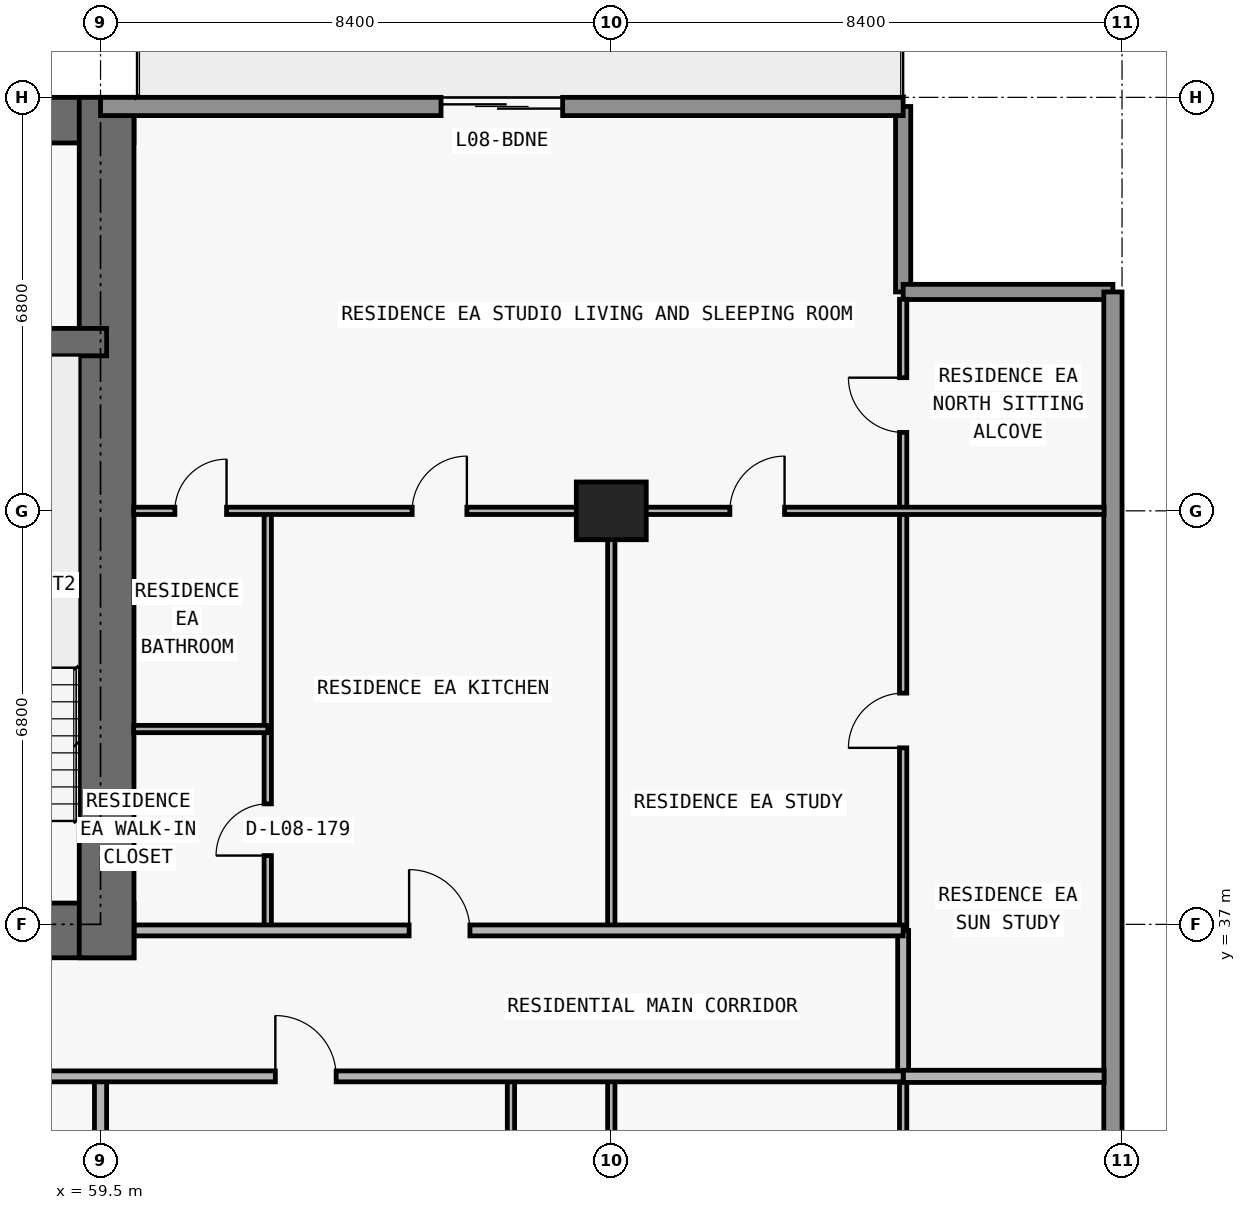
"""IFC4 building model, lengths in metres.
Left out: names, types, materials, properties, quantities, classifications, styles, units other than length and angle.
Written with IfcOpenShell. Run it as: python <this file> out.ifc"""

import sys

from ifc_helpers import new_model, si_unit, direction, frame, frame_2d, origin, origin_2d, place, context, subcontext, project, spatial, rectangle, extrude, element, fill, save


model = new_model("IFC4")
c1 = context("Model", 3, precision=1e-05, world=origin(), true_north=direction((0.0, 1.0)))
c2 = subcontext(c1, "Body", "Model", "MODEL_VIEW")
j1 = project(units=[si_unit("LENGTHUNIT", "METRE"), si_unit("PLANEANGLEUNIT", "RADIAN")], contexts=[c1])
p1 = place(None, origin())
s1 = spatial("IfcSite", under=j1, at=p1, CompositionType="ELEMENT")
p2 = place(p1, origin())
s2 = spatial("IfcBuilding", under=s1, at=p2, CompositionType="ELEMENT")
p3 = place(p2, frame((0.0, 0.0, 36.6)))
s3 = spatial("IfcBuildingStorey", under=s2, at=p3, CompositionType="ELEMENT", Elevation=36.6)
p4 = place(p3, frame((67.9, 43.8, 0.0), z_axis=(0.0, 0.0, 1.0), x_axis=(1.0, 0.0, 0.0)))
e1 = element("IfcColumn", 1, at=p4, inside=s3, PredefinedType="COLUMN", context=c2, shape_type="SweptSolid", body=[
    extrude(rectangle(XDim=1.15, YDim=0.95, at=origin_2d()), origin(), (0.0, 0.0, 1.0), 3.05),
])
p5 = place(p3, frame((17.75, 36.9, 0.0), z_axis=(0.0, 0.0, 1.0), x_axis=(1.0, 0.0, 0.0)))
e2 = element("IfcWall", 2, at=p5, inside=s3, PredefinedType="SHEAR", context=c2, shape_type="SweptSolid", body=[
    extrude(rectangle(XDim=42.3, YDim=0.9, at=frame_2d((21.15, 0.0))), origin(), (0.0, 0.0, 1.0), 3.05),
])
p6 = place(p5, frame((14.55, 0.0, 0.0)))
e3 = element("IfcOpeningElement", 3, at=p6, cuts=e2, PredefinedType="OPENING", context=c2, shape_type="SweptSolid", body=[
    extrude(rectangle(XDim=1.1, YDim=2.15, at=frame_2d((0.55, 1.075))), frame((0.0, 0.46, 0.0), z_axis=(0.0, -1.0, 0.0), x_axis=(1.0, 0.0, 0.0)), (0.0, 0.0, 1.0), 0.92),
])
p7 = place(p5, frame((6.4, 0.0, 0.0)))
e4 = element("IfcOpeningElement", 4, at=p7, cuts=e2, PredefinedType="OPENING", context=c2, shape_type="SweptSolid", body=[
    extrude(rectangle(XDim=1.05, YDim=2.15, at=frame_2d((0.525, 1.075))), frame((0.0, 0.46, 0.0), z_axis=(0.0, -1.0, 0.0), x_axis=(1.0, 0.0, 0.0)), (0.0, 0.0, 1.0), 0.92),
])
p8 = place(p5, frame((34.9, 0.0, 0.0)))
e5 = element("IfcOpeningElement", 5, at=p8, cuts=e2, PredefinedType="OPENING", context=c2, shape_type="SweptSolid", body=[
    extrude(rectangle(XDim=1.05, YDim=2.15, at=frame_2d((0.525, 1.075))), frame((0.0, 0.46, 0.0), z_axis=(0.0, -1.0, 0.0), x_axis=(1.0, 0.0, 0.0)), (0.0, 0.0, 1.0), 0.92),
])
p9 = place(p5, frame((11.012, 0.0, 0.0)))
e6 = element("IfcOpeningElement", 6, at=p9, cuts=e2, PredefinedType="OPENING", context=c2, shape_type="SweptSolid", body=[
    extrude(rectangle(XDim=1.05, YDim=2.15, at=frame_2d((0.525, 1.075))), frame((0.0, 0.46, 0.0), z_axis=(0.0, -1.0, 0.0), x_axis=(1.0, 0.0, 0.0)), (0.0, 0.0, 1.0), 0.92),
])
p10 = place(p5, frame((24.25, 0.0, 0.0)))
e7 = element("IfcOpeningElement", 7, at=p10, cuts=e2, PredefinedType="OPENING", context=c2, shape_type="SweptSolid", body=[
    extrude(rectangle(XDim=1.05, YDim=2.15, at=frame_2d((0.525, 1.075))), frame((0.0, 0.46, 0.0), z_axis=(0.0, -1.0, 0.0), x_axis=(1.0, 0.0, 0.0)), (0.0, 0.0, 1.0), 0.92),
])
p11 = place(p3, frame((17.75, 50.225, 0.0), z_axis=(0.0, 0.0, 1.0), x_axis=(1.0, 0.0, 0.0)))
e8 = element("IfcWall", 8, at=p11, inside=s3, PredefinedType="SHEAR", context=c2, shape_type="SweptSolid", body=[
    extrude(rectangle(XDim=42.3, YDim=0.75, at=frame_2d((21.15, 0.0))), origin(), (0.0, 0.0, 1.0), 3.05),
])
p12 = place(p3, frame((59.6, 36.45, 0.0), z_axis=(0.0, 0.0, 1.0), x_axis=(0.0, 1.0, 0.0)))
e9 = element("IfcWall", 9, at=p12, inside=s3, PredefinedType="SHEAR", context=c2, shape_type="SweptSolid", body=[
    extrude(rectangle(XDim=14.15, YDim=0.9, at=frame_2d((7.075, 0.0))), origin(), (0.0, 0.0, 1.0), 3.05),
])
p13 = place(p3, frame((18.2, 46.575, 0.0), z_axis=(0.0, 0.0, 1.0), x_axis=(1.0, 0.0, 0.0)))
e10 = element("IfcWall", 10, at=p13, inside=s3, PredefinedType="SHEAR", context=c2, shape_type="SweptSolid", body=[
    extrude(rectangle(XDim=41.4, YDim=0.45, at=frame_2d((20.7, 0.0))), origin(), (0.0, 0.0, 1.0), 3.05),
])
p14 = place(p13, frame((7.7, 0.0, 0.0)))
e11 = element("IfcOpeningElement", 11, at=p14, cuts=e10, PredefinedType="OPENING", context=c2, shape_type="SweptSolid", body=[
    extrude(rectangle(XDim=1.0, YDim=2.2, at=frame_2d((0.5, 1.1))), frame((0.0, 0.235, 0.0), z_axis=(0.0, -1.0, 0.0), x_axis=(1.0, 0.0, 0.0)), (0.0, 0.0, 1.0), 0.47),
])
p15 = place(p13, frame((32.725, 0.0, 0.0)))
e12 = element("IfcOpeningElement", 12, at=p15, cuts=e10, PredefinedType="OPENING", context=c2, shape_type="SweptSolid", body=[
    extrude(rectangle(XDim=1.05, YDim=2.15, at=frame_2d((0.525, 1.075))), frame((0.0, 0.235, 0.0), z_axis=(0.0, -1.0, 0.0), x_axis=(1.0, 0.0, 0.0)), (0.0, 0.0, 1.0), 0.47),
])
p16 = place(p3, frame((72.7, 50.45, 0.0), z_axis=(0.0, 0.0, 1.0), x_axis=(0.0, -1.0, 0.0)))
e13 = element("IfcWall", 13, at=p16, inside=s3, PredefinedType="ELEMENTEDWALL", context=c2, shape_type="SweptSolid", body=[
    extrude(rectangle(XDim=3.05, YDim=0.25, at=frame_2d((1.525, 0.0))), origin(), (0.0, 0.0, 1.0), 3.05),
])
p17 = place(p3, frame((72.7, 47.4, 0.0), z_axis=(0.0, 0.0, 1.0), x_axis=(1.0, 0.0, 0.0)))
e14 = element("IfcWall", 14, at=p17, inside=s3, PredefinedType="ELEMENTEDWALL", context=c2, shape_type="SweptSolid", body=[
    extrude(rectangle(XDim=3.45, YDim=0.25, at=frame_2d((1.725, 0.0))), origin(), (0.0, 0.0, 1.0), 3.05),
])
p18 = place(p3, frame((76.15, 47.4, 0.0), z_axis=(0.0, 0.0, 1.0), x_axis=(0.0, -1.0, 0.0)))
e15 = element("IfcWall", 15, at=p18, inside=s3, PredefinedType="STANDARD", context=c2, shape_type="SweptSolid", body=[
    extrude(rectangle(XDim=20.6, YDim=0.3, at=frame_2d((10.3, 0.0))), origin(), (0.0, 0.0, 1.0), 3.05),
])
p19 = place(p3, frame((59.5, 50.45, 0.0), z_axis=(0.0, 0.0, 1.0), x_axis=(1.0, 0.0, 0.0)))
e16 = element("IfcWall", 16, at=p19, inside=s3, PredefinedType="STANDARD", context=c2, shape_type="SweptSolid", body=[
    extrude(rectangle(XDim=13.2, YDim=0.3, at=frame_2d((6.6, 0.0))), origin(), (0.0, 0.0, 1.0), 3.05),
])
p20 = place(p19, frame((5.6, 0.0, 0.0)))
e17 = element("IfcOpeningElement", 17, at=p20, cuts=e16, PredefinedType="OPENING", context=c2, shape_type="SweptSolid", body=[
    extrude(rectangle(XDim=2.0, YDim=2.3, at=frame_2d((1.0, 1.15))), frame((0.0, 0.16, 0.0), z_axis=(0.0, -1.0, 0.0), x_axis=(1.0, 0.0, 0.0)), (0.0, 0.0, 1.0), 0.32),
])
p21 = place(p3, frame((59.5, 27.64, 0.0), z_axis=(0.0, 0.0, 1.0), x_axis=(0.0, 1.0, 0.0)))
e18 = element("IfcWall", 18, at=p21, inside=s3, PredefinedType="PARTITIONING", context=c2, shape_type="SweptSolid", body=[
    extrude(rectangle(XDim=6.86, YDim=0.2, at=frame_2d((3.43, 0.0))), origin(), (0.0, 0.0, 1.0), 2.11),
])
p22 = place(p3, frame((62.25, 36.9, 0.0), z_axis=(0.0, 0.0, 1.0), x_axis=(0.0, 1.0, 0.0)))
e19 = element("IfcWall", 19, at=p22, inside=s3, PredefinedType="PARTITIONING", context=c2, shape_type="SweptSolid", body=[
    extrude(rectangle(XDim=6.9, YDim=0.12, at=frame_2d((3.45, 0.0))), origin(), (0.0, 0.0, 1.0), 2.486),
])
p23 = place(p22, frame((1.231, 0.0, 0.0)))
e20 = element("IfcOpeningElement", 20, at=p23, cuts=e19, PredefinedType="OPENING", context=c2, shape_type="SweptSolid", body=[
    extrude(rectangle(XDim=0.85, YDim=2.1, at=frame_2d((0.425, 1.05))), frame((0.0, 0.07, 0.0), z_axis=(0.0, -1.0, 0.0), x_axis=(1.0, 0.0, 0.0)), (0.0, 0.0, 1.0), 0.14),
])
p24 = place(p3, frame((66.25, 27.64, 0.0), z_axis=(0.0, 0.0, 1.0), x_axis=(0.0, 1.0, 0.0)))
e21 = element("IfcWall", 21, at=p24, inside=s3, PredefinedType="PARTITIONING", context=c2, shape_type="SweptSolid", body=[
    extrude(rectangle(XDim=6.86, YDim=0.12, at=frame_2d((3.43, 0.0))), origin(), (0.0, 0.0, 1.0), 3.05),
])
p25 = place(p24, frame((3.005, 0.0, 0.0)))
e22 = element("IfcOpeningElement", 22, at=p25, cuts=e21, PredefinedType="OPENING", context=c2, shape_type="SweptSolid", body=[
    extrude(rectangle(XDim=0.85, YDim=2.1, at=frame_2d((0.425, 1.05))), frame((0.0, 0.07, 0.0), z_axis=(0.0, -1.0, 0.0), x_axis=(1.0, 0.0, 0.0)), (0.0, 0.0, 1.0), 0.14),
])
p26 = place(p3, frame((67.9, 27.64, 0.0), z_axis=(0.0, 0.0, 1.0), x_axis=(0.0, 1.0, 0.0)))
e23 = element("IfcWall", 23, at=p26, inside=s3, PredefinedType="PARTITIONING", context=c2, shape_type="SweptSolid", body=[
    extrude(rectangle(XDim=6.86, YDim=0.12, at=frame_2d((3.43, 0.0))), origin(), (0.0, 0.0, 1.0), 2.11),
])
p27 = place(p3, frame((67.9, 36.9, 0.0), z_axis=(0.0, 0.0, 1.0), x_axis=(0.0, 1.0, 0.0)))
e24 = element("IfcWall", 24, at=p27, inside=s3, PredefinedType="PARTITIONING", context=c2, shape_type="SweptSolid", body=[
    extrude(rectangle(XDim=6.9, YDim=0.12, at=frame_2d((3.45, 0.0))), origin(), (0.0, 0.0, 1.0), 2.11),
])
p28 = place(p3, frame((72.7, 27.64, 0.0), z_axis=(0.0, 0.0, 1.0), x_axis=(0.0, 1.0, 0.0)))
e25 = element("IfcWall", 25, at=p28, inside=s3, PredefinedType="PARTITIONING", context=c2, shape_type="SweptSolid", body=[
    extrude(rectangle(XDim=6.86, YDim=0.12, at=frame_2d((3.43, 0.0))), origin(), (0.0, 0.0, 1.0), 3.05),
])
p29 = place(p3, frame((72.7, 34.505, 0.0), z_axis=(0.0, 0.0, 1.0), x_axis=(0.0, 1.0, 0.0)))
e26 = element("IfcWall", 26, at=p29, inside=s3, PredefinedType="PARTITIONING", context=c2, shape_type="SweptSolid", body=[
    extrude(rectangle(XDim=2.395, YDim=0.18, at=frame_2d((1.198, 0.0))), origin(), (0.0, 0.0, 1.0), 3.05),
])
p30 = place(p3, frame((72.7, 36.905, 0.0), z_axis=(0.0, 0.0, 1.0), x_axis=(0.0, 1.0, 0.0)))
e27 = element("IfcWall", 27, at=p30, inside=s3, PredefinedType="PARTITIONING", context=c2, shape_type="SweptSolid", body=[
    extrude(rectangle(XDim=10.375, YDim=0.12, at=frame_2d((5.188, 0.0))), origin(), (0.0, 0.0, 1.0), 3.05),
])
p31 = place(p30, frame((2.998, 0.0, 0.0)))
e28 = element("IfcOpeningElement", 28, at=p31, cuts=e27, PredefinedType="OPENING", context=c2, shape_type="SweptSolid", body=[
    extrude(rectangle(XDim=0.9, YDim=2.15, at=frame_2d((0.45, 1.075))), frame((0.0, 0.07, 0.0), z_axis=(0.0, -1.0, 0.0), x_axis=(1.0, 0.0, 0.0)), (0.0, 0.0, 1.0), 0.14),
])
p32 = place(p30, frame((8.185, 0.0, 0.0)))
e29 = element("IfcOpeningElement", 29, at=p32, cuts=e27, PredefinedType="OPENING", context=c2, shape_type="SweptSolid", body=[
    extrude(rectangle(XDim=0.9, YDim=2.15, at=frame_2d((0.45, 1.075))), frame((0.0, 0.07, 0.0), z_axis=(0.0, -1.0, 0.0), x_axis=(1.0, 0.0, 0.0)), (0.0, 0.0, 1.0), 0.14),
])
p33 = place(p3, frame((55.9, 34.5, 0.0), z_axis=(0.0, 0.0, 1.0), x_axis=(1.0, 0.0, 0.0)))
e30 = element("IfcWall", 30, at=p33, inside=s3, PredefinedType="PARTITIONING", context=c2, shape_type="SweptSolid", body=[
    extrude(rectangle(XDim=16.8, YDim=0.18, at=frame_2d((8.4, 0.0))), origin(), (0.0, 0.0, 1.0), 3.05),
])
p34 = place(p33, frame((6.475, 0.0, 0.0)))
e31 = element("IfcOpeningElement", 31, at=p34, cuts=e30, PredefinedType="OPENING", context=c2, shape_type="SweptSolid", body=[
    extrude(rectangle(XDim=1.0, YDim=2.2, at=frame_2d((0.5, 1.1))), frame((0.0, 0.1, 0.0), z_axis=(0.0, -1.0, 0.0), x_axis=(1.0, 0.0, 0.0)), (0.0, 0.0, 1.0), 0.2),
])
p35 = place(p3, frame((72.705, 34.5, 0.0), z_axis=(0.0, 0.0, 1.0), x_axis=(1.0, 0.0, 0.0)))
e32 = element("IfcWall", 32, at=p35, inside=s3, PredefinedType="PARTITIONING", context=c2, shape_type="SweptSolid", body=[
    extrude(rectangle(XDim=3.3, YDim=0.2, at=frame_2d((1.65, 0.0))), origin(), (0.0, 0.0, 1.0), 3.05),
])
p36 = place(p3, frame((60.055, 36.9, 0.0), z_axis=(0.0, 0.0, 1.0), x_axis=(1.0, 0.0, 0.0)))
e33 = element("IfcWall", 33, at=p36, inside=s3, PredefinedType="PARTITIONING", context=c2, shape_type="SweptSolid", body=[
    extrude(rectangle(XDim=12.645, YDim=0.18, at=frame_2d((6.323, 0.0))), origin(), (0.0, 0.0, 1.0), 3.05),
])
p37 = place(p36, frame((4.52, 0.0, 0.0)))
e34 = element("IfcOpeningElement", 34, at=p37, cuts=e33, PredefinedType="OPENING", context=c2, shape_type="SweptSolid", body=[
    extrude(rectangle(XDim=1.0, YDim=2.2, at=frame_2d((0.5, 1.1))), frame((0.0, 0.1, 0.0), z_axis=(0.0, -1.0, 0.0), x_axis=(1.0, 0.0, 0.0)), (0.0, 0.0, 1.0), 0.2),
])
p38 = place(p3, frame((60.045, 40.212, 0.0), z_axis=(0.0, 0.0, 1.0), x_axis=(1.0, 0.0, 0.0)))
e35 = element("IfcWall", 35, at=p38, inside=s3, PredefinedType="PARTITIONING", context=c2, shape_type="SweptSolid", body=[
    extrude(rectangle(XDim=2.205, YDim=0.12, at=frame_2d((1.103, 0.0))), origin(), (0.0, 0.0, 1.0), 3.05),
])
p39 = place(p3, frame((60.045, 43.8, 0.0), z_axis=(0.0, 0.0, 1.0), x_axis=(1.0, 0.0, 0.0)))
e36 = element("IfcWall", 36, at=p39, inside=s3, PredefinedType="PARTITIONING", context=c2, shape_type="SweptSolid", body=[
    extrude(rectangle(XDim=15.96, YDim=0.12, at=frame_2d((7.98, 0.0))), origin(), (0.0, 0.0, 1.0), 2.339),
])
p40 = place(p39, frame((9.805, 0.0, 0.0)))
e37 = element("IfcOpeningElement", 37, at=p40, cuts=e36, PredefinedType="OPENING", context=c2, shape_type="SweptSolid", body=[
    extrude(rectangle(XDim=0.9, YDim=2.15, at=frame_2d((0.45, 1.075))), frame((0.0, 0.07, 0.0), z_axis=(0.0, -1.0, 0.0), x_axis=(1.0, 0.0, 0.0)), (0.0, 0.0, 1.0), 0.14),
])
p41 = place(p39, frame((4.58, 0.0, 0.0)))
e38 = element("IfcOpeningElement", 38, at=p41, cuts=e36, PredefinedType="OPENING", context=c2, shape_type="SweptSolid", body=[
    extrude(rectangle(XDim=0.9, YDim=2.15, at=frame_2d((0.45, 1.075))), frame((0.0, 0.07, 0.0), z_axis=(0.0, -1.0, 0.0), x_axis=(1.0, 0.0, 0.0)), (0.0, 0.0, 1.0), 0.14),
])
p42 = place(p39, frame((0.677, 0.0, 0.0)))
e39 = element("IfcOpeningElement", 39, at=p42, cuts=e36, PredefinedType="OPENING", context=c2, shape_type="SweptSolid", body=[
    extrude(rectangle(XDim=0.85, YDim=2.1, at=frame_2d((0.425, 1.05))), frame((0.0, 0.07, 0.0), z_axis=(0.0, -1.0, 0.0), x_axis=(1.0, 0.0, 0.0)), (0.0, 0.0, 1.0), 0.14),
])
p43 = place(p20, origin())
e40 = element("IfcDoor", 40, at=p43, inside=s3, OperationType="DOUBLE_DOOR_SLIDING", PredefinedType="DOOR", context=c2, shape_type="SweptSolid", body=[
    extrude(rectangle(XDim=2.0, YDim=2.3, at=frame_2d((1.0, 1.15))), frame((0.0, 0.025, 0.0), z_axis=(0.0, -1.0, 0.0), x_axis=(1.0, 0.0, 0.0)), (0.0, 0.0, 1.0), 0.05),
])
fill(e17, e40)
p44 = place(p34, origin())
e41 = element("IfcDoor", 41, at=p44, inside=s3, OperationType="SINGLE_SWING_LEFT", PredefinedType="DOOR", context=c2, shape_type="SweptSolid", body=[
    extrude(rectangle(XDim=1.0, YDim=2.2, at=frame_2d((0.5, 1.1))), frame((0.0, 0.025, 0.0), z_axis=(0.0, -1.0, 0.0), x_axis=(1.0, 0.0, 0.0)), (0.0, 0.0, 1.0), 0.05),
])
fill(e31, e41)
p45 = place(p40, origin())
e42 = element("IfcDoor", 42, at=p45, inside=s3, OperationType="SINGLE_SWING_RIGHT", PredefinedType="DOOR", context=c2, shape_type="SweptSolid", body=[
    extrude(rectangle(XDim=0.9, YDim=2.15, at=frame_2d((0.45, 1.075))), frame((0.0, 0.025, 0.0), z_axis=(0.0, -1.0, 0.0), x_axis=(1.0, 0.0, 0.0)), (0.0, 0.0, 1.0), 0.05),
])
fill(e37, e42)
p46 = place(p37, origin())
e43 = element("IfcDoor", 43, at=p46, inside=s3, OperationType="SINGLE_SWING_LEFT", PredefinedType="DOOR", context=c2, shape_type="SweptSolid", body=[
    extrude(rectangle(XDim=1.0, YDim=2.2, at=frame_2d((0.5, 1.1))), frame((0.0, 0.025, 0.0), z_axis=(0.0, -1.0, 0.0), x_axis=(1.0, 0.0, 0.0)), (0.0, 0.0, 1.0), 0.05),
])
fill(e34, e43)
p47 = place(p41, origin())
e44 = element("IfcDoor", 44, at=p47, inside=s3, OperationType="SINGLE_SWING_RIGHT", PredefinedType="DOOR", context=c2, shape_type="SweptSolid", body=[
    extrude(rectangle(XDim=0.9, YDim=2.15, at=frame_2d((0.45, 1.075))), frame((0.0, 0.025, 0.0), z_axis=(0.0, -1.0, 0.0), x_axis=(1.0, 0.0, 0.0)), (0.0, 0.0, 1.0), 0.05),
])
fill(e38, e44)
p48 = place(p23, origin())
e45 = element("IfcDoor", 45, at=p48, inside=s3, OperationType="SINGLE_SWING_LEFT", PredefinedType="DOOR", context=c2, shape_type="SweptSolid", body=[
    extrude(rectangle(XDim=0.85, YDim=2.1, at=frame_2d((0.425, 1.05))), frame((0.0, 0.025, 0.0), z_axis=(0.0, -1.0, 0.0), x_axis=(1.0, 0.0, 0.0)), (0.0, 0.0, 1.0), 0.05),
])
fill(e20, e45)
p49 = place(p42, origin())
e46 = element("IfcDoor", 46, at=p49, inside=s3, OperationType="SINGLE_SWING_RIGHT", PredefinedType="DOOR", context=c2, shape_type="SweptSolid", body=[
    extrude(rectangle(XDim=0.85, YDim=2.1, at=frame_2d((0.425, 1.05))), frame((0.0, 0.025, 0.0), z_axis=(0.0, -1.0, 0.0), x_axis=(1.0, 0.0, 0.0)), (0.0, 0.0, 1.0), 0.05),
])
fill(e39, e46)
p50 = place(p31, origin())
e47 = element("IfcDoor", 47, at=p50, inside=s3, OperationType="SINGLE_SWING_LEFT", PredefinedType="DOOR", context=c2, shape_type="SweptSolid", body=[
    extrude(rectangle(XDim=0.9, YDim=2.15, at=frame_2d((0.45, 1.075))), frame((0.0, 0.025, 0.0), z_axis=(0.0, -1.0, 0.0), x_axis=(1.0, 0.0, 0.0)), (0.0, 0.0, 1.0), 0.05),
])
fill(e28, e47)
p51 = place(p32, origin())
e48 = element("IfcDoor", 48, at=p51, inside=s3, OperationType="SINGLE_SWING_RIGHT", PredefinedType="DOOR", context=c2, shape_type="SweptSolid", body=[
    extrude(rectangle(XDim=0.9, YDim=2.15, at=frame_2d((0.45, 1.075))), frame((0.0, 0.025, 0.0), z_axis=(0.0, -1.0, 0.0), x_axis=(1.0, 0.0, 0.0)), (0.0, 0.0, 1.0), 0.05),
])
fill(e29, e48)
save(model, sys.argv[1])
